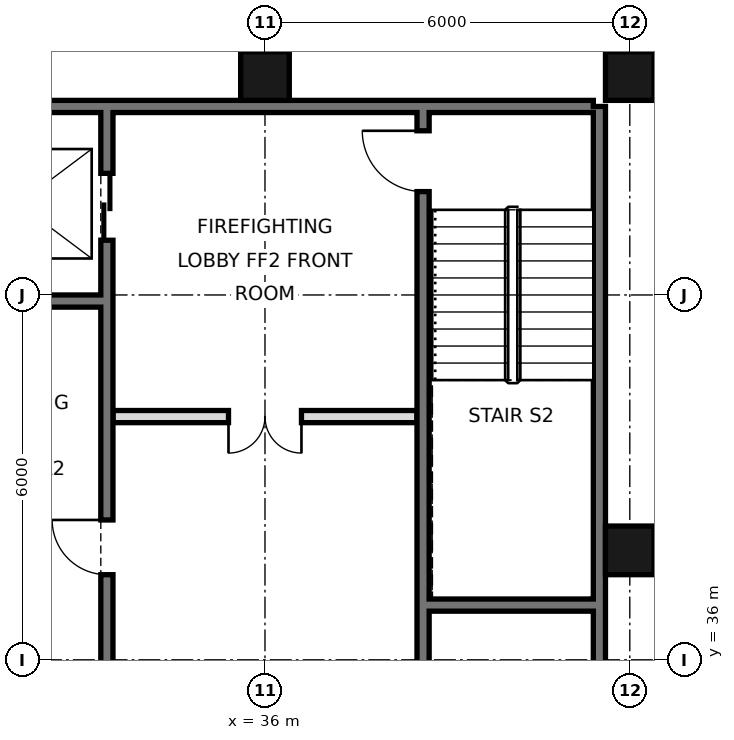
"""IFC4 building model, lengths in metres.
Left out: names, types, materials, properties, quantities, classifications, styles, units other than length and angle.
Written with IfcOpenShell. Run it as: python <this file> out.ifc"""

import sys

from ifc_helpers import new_model, si_unit, direction, frame, frame_2d, origin, origin_2d, place, context, subcontext, project, spatial, rectangle, hollow_rectangle, extrude, element, fill, save


model = new_model("IFC4")
c1 = context("Model", 3, precision=1e-05, world=origin(), true_north=direction((0.0, 1.0)))
c2 = subcontext(c1, "Body", "Model", "MODEL_VIEW")
j1 = project(units=[si_unit("LENGTHUNIT", "METRE"), si_unit("PLANEANGLEUNIT", "RADIAN")], contexts=[c1])
p1 = place(None, origin())
s1 = spatial("IfcSite", under=j1, at=p1, CompositionType="ELEMENT")
p2 = place(p1, origin())
s2 = spatial("IfcBuilding", under=s1, at=p2, CompositionType="ELEMENT")
p3 = place(p2, frame((0.0, 0.0, 130.4)))
s3 = spatial("IfcBuildingStorey", under=s2, at=p3, CompositionType="ELEMENT", Elevation=130.4)
for number, where, z_axis, x_axis in (
    (1, (36.0, 45.6, 0.0), (0.0, 0.0, 1.0), (1.0, 0.0, 0.0)),
    (2, (42.0, 37.8, 0.0), (0.0, 0.0, 1.0), (1.0, 0.0, 0.0)),
    (3, (42.0, 45.6, 0.0), (0.0, 0.0, 1.0), (1.0, 0.0, 0.0)),
):
    element("IfcColumn", number, at=place(p3, frame(where, z_axis=z_axis, x_axis=x_axis)), inside=s3, PredefinedType="COLUMN", context=c2, shape_type="SweptSolid", body=[
        extrude(hollow_rectangle(XDim=0.8, YDim=0.8, WallThickness=0.05, at=origin_2d()), origin(), (0.0, 0.0, 1.0), 3.6),
    ])
p4 = place(p3, frame((41.5, 21.6, 0.0), z_axis=(0.0, 0.0, 1.0), x_axis=(0.0, 1.0, 0.0)))
e4 = element("IfcWall", 4, at=p4, inside=s3, PredefinedType="SOLIDWALL", context=c2, shape_type="SweptSolid", body=[
    extrude(rectangle(XDim=23.5, YDim=0.2, at=frame_2d((11.75, 0.0))), origin(), (0.0, 0.0, 1.0), 3.42),
])
p5 = place(p3, frame((6.6, 45.1, 0.0), z_axis=(0.0, 0.0, 1.0), x_axis=(1.0, 0.0, 0.0)))
e5 = element("IfcWall", 5, at=p5, inside=s3, PredefinedType="SOLIDWALL", context=c2, shape_type="SweptSolid", body=[
    extrude(rectangle(XDim=34.8, YDim=0.2, at=frame_2d((17.4, 0.0))), origin(), (0.0, 0.0, 1.0), 3.42),
])
p6 = place(p3, frame((33.4, 27.5, 0.0), z_axis=(0.0, 0.0, 1.0), x_axis=(0.0, 1.0, 0.0)))
e6 = element("IfcWall", 6, at=p6, inside=s3, PredefinedType="SOLIDWALL", context=c2, shape_type="SweptSolid", body=[
    extrude(rectangle(XDim=17.5, YDim=0.2, at=frame_2d((8.75, 0.0))), origin(), (0.0, 0.0, 1.0), 3.42),
])
p7 = place(p6, frame((15.4, 0.0, 0.0)))
e7 = element("IfcOpeningElement", 7, at=p7, cuts=e6, PredefinedType="OPENING", context=c2, shape_type="SweptSolid", body=[
    extrude(rectangle(XDim=1.1, YDim=2.1, at=frame_2d((0.55, 1.05))), frame((0.0, 0.11, 0.0), z_axis=(0.0, -1.0, 0.0), x_axis=(1.0, 0.0, 0.0)), (0.0, 0.0, 1.0), 0.22),
])
p8 = place(p6, frame((2.7, 0.0, 0.0)))
e8 = element("IfcOpeningElement", 8, at=p8, cuts=e6, PredefinedType="OPENING", context=c2, shape_type="SweptSolid", body=[
    extrude(rectangle(XDim=1.0, YDim=2.1, at=frame_2d((0.5, 1.05))), frame((0.0, 0.11, 0.0), z_axis=(0.0, -1.0, 0.0), x_axis=(1.0, 0.0, 0.0)), (0.0, 0.0, 1.0), 0.22),
])
p9 = place(p6, frame((9.9, 0.0, 0.0)))
e9 = element("IfcOpeningElement", 9, at=p9, cuts=e6, PredefinedType="OPENING", context=c2, shape_type="SweptSolid", body=[
    extrude(rectangle(XDim=0.9, YDim=2.1, at=frame_2d((0.45, 1.05))), frame((0.0, 0.11, 0.0), z_axis=(0.0, -1.0, 0.0), x_axis=(1.0, 0.0, 0.0)), (0.0, 0.0, 1.0), 0.22),
])
p10 = place(p3, frame((38.6, 21.6, 0.0), z_axis=(0.0, 0.0, 1.0), x_axis=(0.0, 1.0, 0.0)))
e10 = element("IfcWall", 10, at=p10, inside=s3, PredefinedType="SOLIDWALL", context=c2, shape_type="SweptSolid", body=[
    extrude(rectangle(XDim=23.4, YDim=0.2, at=frame_2d((11.7, 0.0))), origin(), (0.0, 0.0, 1.0), 3.42),
])
p11 = place(p10, frame((8.6, 0.0, 0.0)))
e11 = element("IfcOpeningElement", 11, at=p11, cuts=e10, PredefinedType="OPENING", context=c2, shape_type="SweptSolid", body=[
    extrude(rectangle(XDim=1.0, YDim=2.1, at=frame_2d((0.5, 1.05))), frame((0.0, 0.11, 0.0), z_axis=(0.0, -1.0, 0.0), x_axis=(1.0, 0.0, 0.0)), (0.0, 0.0, 1.0), 0.22),
])
p12 = place(p10, frame((13.25, 0.0, 0.0)))
e12 = element("IfcOpeningElement", 12, at=p12, cuts=e10, PredefinedType="OPENING", context=c2, shape_type="SweptSolid", body=[
    extrude(rectangle(XDim=1.0, YDim=2.1, at=frame_2d((0.5, 1.05))), frame((0.0, 0.11, 0.0), z_axis=(0.0, -1.0, 0.0), x_axis=(1.0, 0.0, 0.0)), (0.0, 0.0, 1.0), 0.22),
])
p13 = place(p10, frame((22.1, 0.0, 0.0)))
e13 = element("IfcOpeningElement", 13, at=p13, cuts=e10, PredefinedType="OPENING", context=c2, shape_type="SweptSolid", body=[
    extrude(rectangle(XDim=1.0, YDim=2.1, at=frame_2d((0.5, 1.05))), frame((0.0, 0.11, 0.0), z_axis=(0.0, -1.0, 0.0), x_axis=(1.0, 0.0, 0.0)), (0.0, 0.0, 1.0), 0.22),
])
p14 = place(p10, frame((0.175, 0.0, 0.0)))
e14 = element("IfcOpeningElement", 14, at=p14, cuts=e10, PredefinedType="OPENING", context=c2, shape_type="SweptSolid", body=[
    extrude(rectangle(XDim=0.9, YDim=2.1, at=frame_2d((0.45, 1.05))), frame((0.0, 0.11, 0.0), z_axis=(0.0, -1.0, 0.0), x_axis=(1.0, 0.0, 0.0)), (0.0, 0.0, 1.0), 0.22),
])
p15 = place(p3, frame((38.7, 36.9, 0.0), z_axis=(0.0, 0.0, 1.0), x_axis=(1.0, 0.0, 0.0)))
e15 = element("IfcWall", 15, at=p15, inside=s3, PredefinedType="SOLIDWALL", context=c2, shape_type="SweptSolid", body=[
    extrude(rectangle(XDim=2.7, YDim=0.2, at=frame_2d((1.35, 0.0))), origin(), (0.0, 0.0, 1.0), 3.42),
])
p16 = place(p3, frame((33.5, 40.0, 0.0), z_axis=(0.0, 0.0, 1.0), x_axis=(1.0, 0.0, 0.0)))
e16 = element("IfcWall", 16, at=p16, inside=s3, PredefinedType="PARTITIONING", context=c2, shape_type="SweptSolid", body=[
    extrude(rectangle(XDim=5.0, YDim=0.2, at=frame_2d((2.5, 0.0))), origin(), (0.0, 0.0, 1.0), 3.42),
])
p17 = place(p16, frame((1.9, 0.0, 0.0)))
e17 = element("IfcOpeningElement", 17, at=p17, cuts=e16, PredefinedType="OPENING", context=c2, shape_type="SweptSolid", body=[
    extrude(rectangle(XDim=1.2, YDim=2.1, at=frame_2d((0.6, 1.05))), frame((0.0, 0.11, 0.0), z_axis=(0.0, -1.0, 0.0), x_axis=(1.0, 0.0, 0.0)), (0.0, 0.0, 1.0), 0.22),
])
p18 = place(p3, frame((30.6, 41.9, 0.0), z_axis=(0.0, 0.0, 1.0), x_axis=(1.0, 0.0, 0.0)))
e18 = element("IfcWall", 18, at=p18, inside=s3, PredefinedType="SOLIDWALL", context=c2, shape_type="SweptSolid", body=[
    extrude(rectangle(XDim=2.7, YDim=0.2, at=frame_2d((1.35, 0.0))), origin(), (0.0, 0.0, 1.0), 3.42),
])
p19 = place(p17, frame((1.2, 0.0, 0.0), z_axis=(0.0, 0.0, 1.0), x_axis=(-1.0, 0.0, 0.0)))
e19 = element("IfcDoor", 19, at=p19, inside=s3, OperationType="DOUBLE_DOOR_SINGLE_SWING", PredefinedType="DOOR", context=c2, shape_type="SweptSolid", body=[
    extrude(rectangle(XDim=1.2, YDim=2.1, at=frame_2d((0.6, 1.05))), frame((0.0, 0.025, 0.0), z_axis=(0.0, -1.0, 0.0), x_axis=(1.0, 0.0, 0.0)), (0.0, 0.0, 1.0), 0.05),
])
fill(e17, e19)
p20 = place(p7, origin())
e20 = element("IfcDoor", 20, at=p20, inside=s3, OperationType="DOUBLE_DOOR_SLIDING", PredefinedType="DOOR", context=c2, shape_type="SweptSolid", body=[
    extrude(rectangle(XDim=1.1, YDim=2.1, at=frame_2d((0.55, 1.05))), frame((0.0, 0.025, 0.0), z_axis=(0.0, -1.0, 0.0), x_axis=(1.0, 0.0, 0.0)), (0.0, 0.0, 1.0), 0.05),
])
fill(e7, e20)
p21 = place(p13, frame((1.0, 0.0, 0.0), z_axis=(0.0, 0.0, 1.0), x_axis=(-1.0, 0.0, 0.0)))
e21 = element("IfcDoor", 21, at=p21, inside=s3, OperationType="SINGLE_SWING_LEFT", PredefinedType="DOOR", context=c2, shape_type="SweptSolid", body=[
    extrude(rectangle(XDim=1.0, YDim=2.1, at=frame_2d((0.5, 1.05))), frame((0.0, 0.025, 0.0), z_axis=(0.0, -1.0, 0.0), x_axis=(1.0, 0.0, 0.0)), (0.0, 0.0, 1.0), 0.05),
])
fill(e13, e21)
p22 = place(p9, frame((0.9, 0.0, 0.0), z_axis=(0.0, 0.0, 1.0), x_axis=(-1.0, 0.0, 0.0)))
e22 = element("IfcDoor", 22, at=p22, inside=s3, OperationType="SINGLE_SWING_LEFT", PredefinedType="DOOR", context=c2, shape_type="SweptSolid", body=[
    extrude(rectangle(XDim=0.9, YDim=2.1, at=frame_2d((0.45, 1.05))), frame((0.0, 0.025, 0.0), z_axis=(0.0, -1.0, 0.0), x_axis=(1.0, 0.0, 0.0)), (0.0, 0.0, 1.0), 0.05),
])
fill(e9, e22)
save(model, sys.argv[1])
